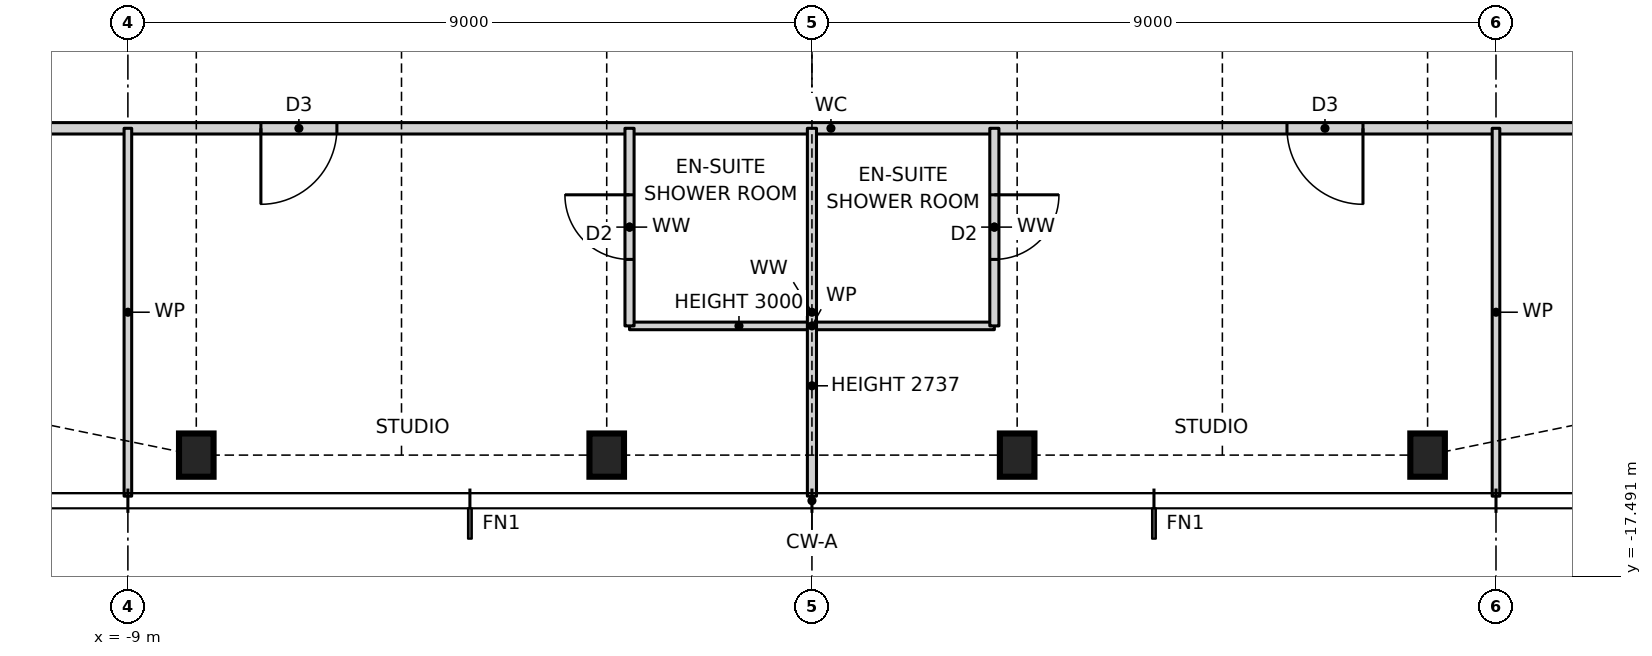
"""IFC4 building model, lengths in metres.
Left out: names, types, materials, properties, quantities, classifications, styles, units other than length and angle.
Written with IfcOpenShell. Run it as: python <this file> out.ifc"""

import sys

from ifc_helpers import new_model, si_unit, direction, frame, frame_2d, origin, origin_2d, place, context, subcontext, project, spatial, rectangle, i_section, extrude, element, fill, save


model = new_model("IFC4")
c1 = context("Model", 3, precision=1e-05, world=origin(), true_north=direction((0.0, 1.0)))
c2 = subcontext(c1, "Body", "Model", "MODEL_VIEW")
j1 = project(units=[si_unit("LENGTHUNIT", "METRE"), si_unit("PLANEANGLEUNIT", "RADIAN")], contexts=[c1])
p1 = place(None, origin())
s1 = spatial("IfcSite", under=j1, at=p1, CompositionType="ELEMENT")
p2 = place(p1, origin())
s2 = spatial("IfcBuilding", under=s1, at=p2, CompositionType="ELEMENT")
p3 = place(p2, frame((0.0, 0.0, 250.0)))
s3 = spatial("IfcBuildingStorey", under=s2, at=p3, CompositionType="ELEMENT", Elevation=250.0)
for number, where, z_axis, x_axis in (
    (1, (-8.1, -15.9, 0.0), (0.0, 0.0, 1.0), (1.0, 0.0, 0.0)),
    (2, (-2.7, -15.9, 0.0), (0.0, 0.0, 1.0), (1.0, 0.0, 0.0)),
    (3, (2.7, -15.9, 0.0), (0.0, 0.0, 1.0), (1.0, 0.0, 0.0)),
    (4, (8.1, -15.9, 0.0), (0.0, 0.0, 1.0), (1.0, 0.0, 0.0)),
):
    element("IfcColumn", number, at=place(p3, frame(where, z_axis=z_axis, x_axis=x_axis)), inside=s3, PredefinedType="COLUMN", context=c2, shape_type="SweptSolid", body=[
        extrude(i_section(OverallWidth=0.455, OverallDepth=0.569, WebThickness=0.078, FlangeThickness=0.125, at=origin_2d()), origin(), (0.0, 0.0, 1.0), 3.5),
    ])
p4 = place(p3, frame((-2.4, -14.2, 0.0), z_axis=(0.0, 0.0, 1.0), x_axis=(1.0, 0.0, 0.0)))
e5 = element("IfcWall", 5, at=p4, inside=s3, PredefinedType="PARTITIONING", context=c2, shape_type="SweptSolid", body=[
    extrude(rectangle(XDim=4.8, YDim=0.1, at=frame_2d((2.4, 0.0))), origin(), (0.0, 0.0, 1.0), 3.0),
])
p5 = place(p3, frame((-11.6, -11.6, 0.0), z_axis=(0.0, 0.0, 1.0), x_axis=(1.0, 0.0, 0.0)))
e6 = element("IfcWall", 6, at=p5, inside=s3, PredefinedType="PARTITIONING", context=c2, shape_type="SweptSolid", body=[
    extrude(rectangle(XDim=23.7, YDim=0.15, at=frame_2d((11.85, 0.0))), origin(), (0.0, 0.0, 1.0), 3.27),
])
p6 = place(p5, frame((4.35, 0.0, 0.0)))
e7 = element("IfcOpeningElement", 7, at=p6, cuts=e6, PredefinedType="OPENING", context=c2, shape_type="SweptSolid", body=[
    extrude(rectangle(XDim=1.0, YDim=2.1, at=frame_2d((0.5, 1.05))), frame((0.0, 0.085, 0.0), z_axis=(0.0, -1.0, 0.0), x_axis=(1.0, 0.0, 0.0)), (0.0, 0.0, 1.0), 0.17),
])
p7 = place(p5, frame((17.85, 0.0, 0.0)))
e8 = element("IfcOpeningElement", 8, at=p7, cuts=e6, PredefinedType="OPENING", context=c2, shape_type="SweptSolid", body=[
    extrude(rectangle(XDim=1.0, YDim=2.1, at=frame_2d((0.5, 1.05))), frame((0.0, 0.085, 0.0), z_axis=(0.0, -1.0, 0.0), x_axis=(1.0, 0.0, 0.0)), (0.0, 0.0, 1.0), 0.17),
])
p8 = place(p5, frame((21.725, 0.0, 0.0)))
e9 = element("IfcOpeningElement", 9, at=p8, cuts=e6, PredefinedType="OPENING", context=c2, shape_type="SweptSolid", body=[
    extrude(rectangle(XDim=0.85, YDim=2.1, at=frame_2d((0.425, 1.05))), frame((0.0, 0.085, 0.0), z_axis=(0.0, -1.0, 0.0), x_axis=(1.0, 0.0, 0.0)), (0.0, 0.0, 1.0), 0.17),
])
p9 = place(p3, frame((9.0, -16.44, 0.0), z_axis=(0.0, 0.0, 1.0), x_axis=(0.0, 1.0, 0.0)))
e10 = element("IfcWall", 10, at=p9, inside=s3, PredefinedType="PARTITIONING", context=c2, shape_type="SweptSolid", body=[
    extrude(rectangle(XDim=4.84, YDim=0.1, at=frame_2d((2.42, 0.0))), origin(), (0.0, 0.0, 1.0), 3.27),
])
p10 = place(p3, frame((2.4, -14.2, 0.0), z_axis=(0.0, 0.0, 1.0), x_axis=(0.0, 1.0, 0.0)))
e11 = element("IfcWall", 11, at=p10, inside=s3, PredefinedType="PARTITIONING", context=c2, shape_type="SweptSolid", body=[
    extrude(rectangle(XDim=2.6, YDim=0.12, at=frame_2d((1.3, 0.0))), origin(), (0.0, 0.0, 1.0), 3.27),
])
p11 = place(p10, frame((0.875, 0.0, 0.0)))
e12 = element("IfcOpeningElement", 12, at=p11, cuts=e11, PredefinedType="OPENING", context=c2, shape_type="SweptSolid", body=[
    extrude(rectangle(XDim=0.85, YDim=2.1, at=frame_2d((0.425, 1.05))), frame((0.0, 0.07, 0.0), z_axis=(0.0, -1.0, 0.0), x_axis=(1.0, 0.0, 0.0)), (0.0, 0.0, 1.0), 0.14),
])
p12 = place(p3, frame((0.0, -16.44, 0.0), z_axis=(0.0, 0.0, 1.0), x_axis=(0.0, 1.0, 0.0)))
e13 = element("IfcWall", 13, at=p12, inside=s3, PredefinedType="PARTITIONING", context=c2, shape_type="SweptSolid", body=[
    extrude(rectangle(XDim=4.84, YDim=0.12, at=frame_2d((2.42, 0.0))), origin(), (0.0, 0.0, 1.0), 2.737),
])
p13 = place(p3, frame((-2.4, -14.2, 0.0), z_axis=(0.0, 0.0, 1.0), x_axis=(0.0, 1.0, 0.0)))
e14 = element("IfcWall", 14, at=p13, inside=s3, PredefinedType="PARTITIONING", context=c2, shape_type="SweptSolid", body=[
    extrude(rectangle(XDim=2.6, YDim=0.12, at=frame_2d((1.3, 0.0))), origin(), (0.0, 0.0, 1.0), 3.27),
])
p14 = place(p13, frame((0.875, 0.0, 0.0)))
e15 = element("IfcOpeningElement", 15, at=p14, cuts=e14, PredefinedType="OPENING", context=c2, shape_type="SweptSolid", body=[
    extrude(rectangle(XDim=0.85, YDim=2.1, at=frame_2d((0.425, 1.05))), frame((0.0, 0.07, 0.0), z_axis=(0.0, -1.0, 0.0), x_axis=(1.0, 0.0, 0.0)), (0.0, 0.0, 1.0), 0.14),
])
p15 = place(p3, frame((-9.0, -16.44, 0.0), z_axis=(0.0, 0.0, 1.0), x_axis=(0.0, 1.0, 0.0)))
e16 = element("IfcWall", 16, at=p15, inside=s3, PredefinedType="PARTITIONING", context=c2, shape_type="SweptSolid", body=[
    extrude(rectangle(XDim=4.84, YDim=0.1, at=frame_2d((2.42, 0.0))), origin(), (0.0, 0.0, 1.0), 3.27),
])
p16 = place(p6, frame((1.0, 0.0, 0.0), z_axis=(0.0, 0.0, 1.0), x_axis=(-1.0, 0.0, 0.0)))
e17 = element("IfcDoor", 17, at=p16, inside=s3, OperationType="SINGLE_SWING_RIGHT", PredefinedType="DOOR", context=c2, shape_type="SweptSolid", body=[
    extrude(rectangle(XDim=1.0, YDim=2.1, at=frame_2d((0.5, 1.05))), frame((0.0, 0.025, 0.0), z_axis=(0.0, -1.0, 0.0), x_axis=(1.0, 0.0, 0.0)), (0.0, 0.0, 1.0), 0.05),
])
fill(e7, e17)
p17 = place(p14, origin())
e18 = element("IfcDoor", 18, at=p17, inside=s3, OperationType="SINGLE_SWING_RIGHT", PredefinedType="DOOR", context=c2, shape_type="SweptSolid", body=[
    extrude(rectangle(XDim=0.85, YDim=2.1, at=frame_2d((0.425, 1.05))), frame((0.0, 0.025, 0.0), z_axis=(0.0, -1.0, 0.0), x_axis=(1.0, 0.0, 0.0)), (0.0, 0.0, 1.0), 0.05),
])
fill(e15, e18)
p18 = place(p7, frame((1.0, 0.0, 0.0), z_axis=(0.0, 0.0, 1.0), x_axis=(-1.0, 0.0, 0.0)))
e19 = element("IfcDoor", 19, at=p18, inside=s3, OperationType="SINGLE_SWING_LEFT", PredefinedType="DOOR", context=c2, shape_type="SweptSolid", body=[
    extrude(rectangle(XDim=1.0, YDim=2.1, at=frame_2d((0.5, 1.05))), frame((0.0, 0.025, 0.0), z_axis=(0.0, -1.0, 0.0), x_axis=(1.0, 0.0, 0.0)), (0.0, 0.0, 1.0), 0.05),
])
fill(e8, e19)
p19 = place(p11, frame((0.85, 0.0, 0.0), z_axis=(0.0, 0.0, 1.0), x_axis=(-1.0, 0.0, 0.0)))
e20 = element("IfcDoor", 20, at=p19, inside=s3, OperationType="SINGLE_SWING_LEFT", PredefinedType="DOOR", context=c2, shape_type="SweptSolid", body=[
    extrude(rectangle(XDim=0.85, YDim=2.1, at=frame_2d((0.425, 1.05))), frame((0.0, 0.025, 0.0), z_axis=(0.0, -1.0, 0.0), x_axis=(1.0, 0.0, 0.0)), (0.0, 0.0, 1.0), 0.05),
])
fill(e12, e20)
save(model, sys.argv[1])
